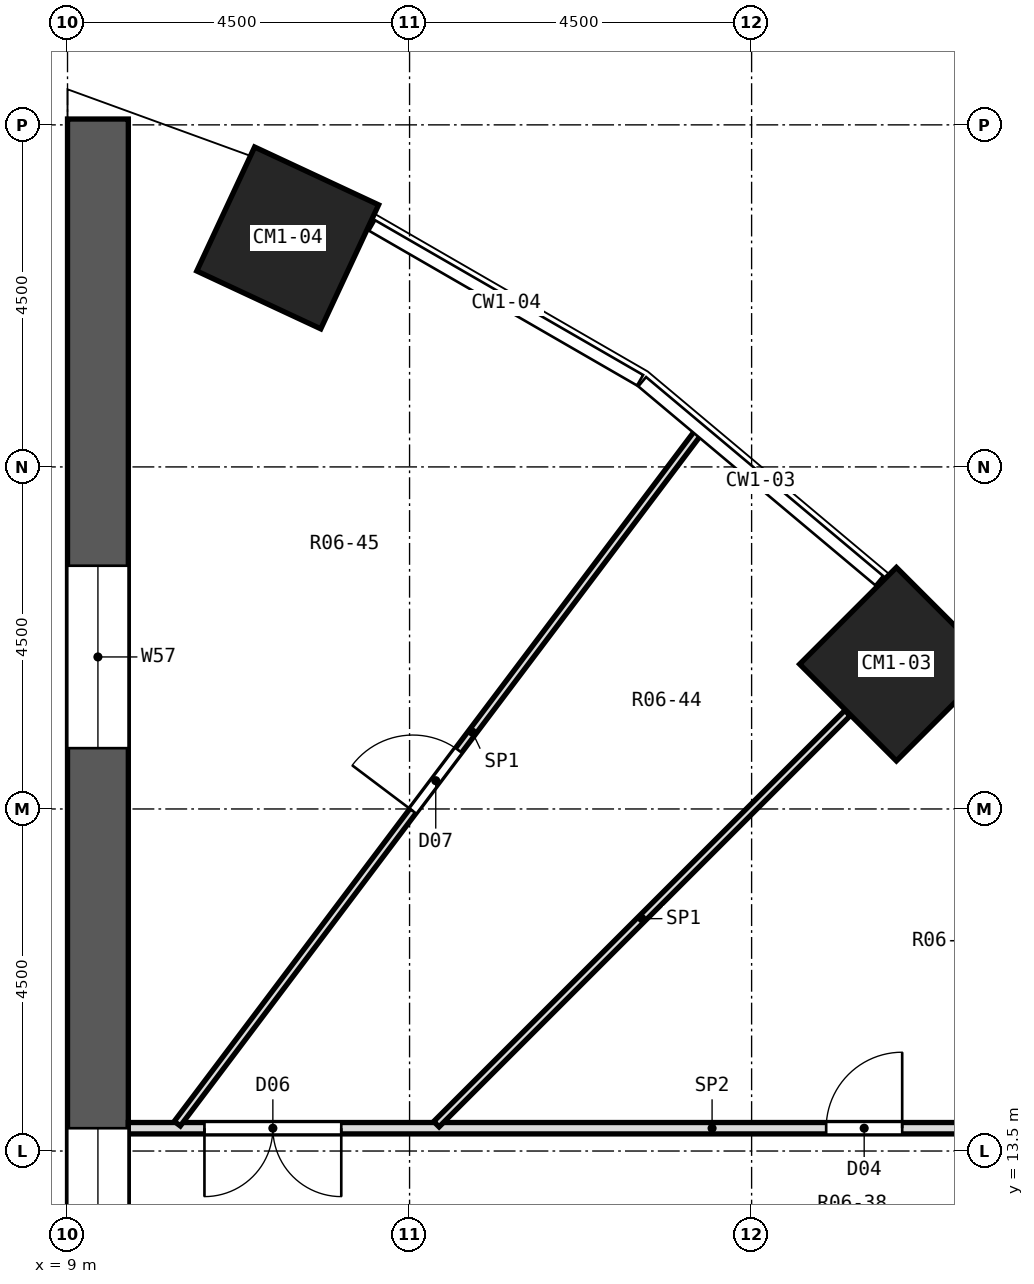
"""IFC4 building model, lengths in metres.
Left out: names, types, materials, properties, quantities, classifications, styles, units other than length and angle.
Written with IfcOpenShell. Run it as: python <this file> out.ifc"""

import sys

from ifc_helpers import new_model, si_unit, direction, frame, frame_2d, origin, origin_2d, place, context, subcontext, project, spatial, polyline, rectangle, outline, extrude, element, fill, save


model = new_model("IFC4")
c1 = context("Model", 3, precision=1e-05, world=origin(), true_north=direction((0.0, 1.0)))
c2 = subcontext(c1, "Body", "Model", "MODEL_VIEW")
j1 = project(units=[si_unit("LENGTHUNIT", "METRE"), si_unit("PLANEANGLEUNIT", "RADIAN")], contexts=[c1])
p1 = place(None, origin())
s1 = spatial("IfcSite", under=j1, at=p1, CompositionType="ELEMENT")
p2 = place(p1, origin())
s2 = spatial("IfcBuilding", under=s1, at=p2, CompositionType="ELEMENT")
p3 = place(p2, frame((0.0, 0.0, 13.4)))
s3 = spatial("IfcBuildingStorey", under=s2, at=p3, CompositionType="ELEMENT", Elevation=13.4)
for number, where, z_axis, x_axis in (
    (1, (19.905, 19.905, 0.0), (0.0, 0.0, 1.0), (0.707, 0.707, 0.0)),
    (2, (11.897, 25.512, 0.0), (0.0, 0.0, 1.0), (0.423, 0.906, 0.0)),
):
    element("IfcColumn", number, at=place(p3, frame(where, z_axis=z_axis, x_axis=x_axis)), inside=s3, PredefinedType="COLUMN", context=c2, shape_type="SweptSolid", body=[
        extrude(rectangle(XDim=1.8, YDim=1.8, at=origin_2d()), origin(), (0.0, 0.0, 1.0), 4.2),
    ])
p4 = place(p3, frame((9.4, -27.077, 0.0), z_axis=(0.0, 0.0, 1.0), x_axis=(0.0, 1.0, 0.0)))
e3 = element("IfcWall", 3, at=p4, inside=s3, PredefinedType="SHEAR", context=c2, shape_type="SweptSolid", body=[
    extrude(rectangle(XDim=54.154, YDim=0.8, at=frame_2d((27.077, 0.0))), origin(), (0.0, 0.0, 1.0), 4.2),
])
p5 = place(p4, frame((13.277, 0.0, 0.9)))
e4 = element("IfcOpeningElement", 4, at=p5, cuts=e3, PredefinedType="OPENING", context=c2, shape_type="SweptSolid", body=[
    extrude(rectangle(XDim=2.4, YDim=2.1, at=frame_2d((1.2, 1.05))), frame((0.0, 0.412, 0.0), z_axis=(0.0, -1.0, 0.0), x_axis=(1.0, 0.0, 0.0)), (0.0, 0.0, 1.0), 0.824),
])
p6 = place(p4, frame((17.877, 0.0, 0.9)))
e5 = element("IfcOpeningElement", 5, at=p6, cuts=e3, PredefinedType="OPENING", context=c2, shape_type="SweptSolid", body=[
    extrude(rectangle(XDim=2.4, YDim=2.1, at=frame_2d((1.2, 1.05))), frame((0.0, 0.412, 0.0), z_axis=(0.0, -1.0, 0.0), x_axis=(1.0, 0.0, 0.0)), (0.0, 0.0, 1.0), 0.824),
])
p7 = place(p4, frame((22.477, 0.0, 0.9)))
e6 = element("IfcOpeningElement", 6, at=p7, cuts=e3, PredefinedType="OPENING", context=c2, shape_type="SweptSolid", body=[
    extrude(rectangle(XDim=2.4, YDim=2.1, at=frame_2d((1.2, 1.05))), frame((0.0, 0.412, 0.0), z_axis=(0.0, -1.0, 0.0), x_axis=(1.0, 0.0, 0.0)), (0.0, 0.0, 1.0), 0.824),
])
p8 = place(p4, frame((29.277, 0.0, 0.9)))
e7 = element("IfcOpeningElement", 7, at=p8, cuts=e3, PredefinedType="OPENING", context=c2, shape_type="SweptSolid", body=[
    extrude(rectangle(XDim=2.4, YDim=2.1, at=frame_2d((1.2, 1.05))), frame((0.0, 0.412, 0.0), z_axis=(0.0, -1.0, 0.0), x_axis=(1.0, 0.0, 0.0)), (0.0, 0.0, 1.0), 0.824),
])
p9 = place(p4, frame((33.877, 0.0, 0.9)))
e8 = element("IfcOpeningElement", 8, at=p9, cuts=e3, PredefinedType="OPENING", context=c2, shape_type="SweptSolid", body=[
    extrude(rectangle(XDim=2.4, YDim=2.1, at=frame_2d((1.2, 1.05))), frame((0.0, 0.412, 0.0), z_axis=(0.0, -1.0, 0.0), x_axis=(1.0, 0.0, 0.0)), (0.0, 0.0, 1.0), 0.824),
])
p10 = place(p4, frame((38.477, 0.0, 0.9)))
e9 = element("IfcOpeningElement", 9, at=p10, cuts=e3, PredefinedType="OPENING", context=c2, shape_type="SweptSolid", body=[
    extrude(rectangle(XDim=2.4, YDim=2.1, at=frame_2d((1.2, 1.05))), frame((0.0, 0.412, 0.0), z_axis=(0.0, -1.0, 0.0), x_axis=(1.0, 0.0, 0.0)), (0.0, 0.0, 1.0), 0.824),
])
p11 = place(p4, frame((5.877, 0.0, 0.9)))
e10 = element("IfcOpeningElement", 10, at=p11, cuts=e3, PredefinedType="OPENING", context=c2, shape_type="SweptSolid", body=[
    extrude(rectangle(XDim=2.4, YDim=2.1, at=frame_2d((1.2, 1.05))), frame((0.0, 0.412, 0.0), z_axis=(0.0, -1.0, 0.0), x_axis=(1.0, 0.0, 0.0)), (0.0, 0.0, 1.0), 0.824),
])
p12 = place(p4, frame((45.877, 0.0, 0.9)))
e11 = element("IfcOpeningElement", 11, at=p12, cuts=e3, PredefinedType="OPENING", context=c2, shape_type="SweptSolid", body=[
    extrude(rectangle(XDim=2.4, YDim=2.1, at=frame_2d((1.2, 1.05))), frame((0.0, 0.412, 0.0), z_axis=(0.0, -1.0, 0.0), x_axis=(1.0, 0.0, 0.0)), (0.0, 0.0, 1.0), 0.824),
])
p13 = place(p3, frame((8.991, 27.443, 0.0), z_axis=(0.342026905008, 0.939688050207, 0.001991117406), x_axis=(0.93968991291, -0.342027583063, 3.2668e-08)))
e12 = element("IfcWall", 12, at=p13, inside=s3, PredefinedType="SOLIDWALL", context=c2, shape_type="SweptSolid", body=[
    extrude(outline(polyline([(0.0, 0.0), (2.81, -2.168e-19), (2.81, -3.65), (4.403e-05, -3.65), (0.0, -4.2), (-0.935, -4.2), (-0.935, -3.65), (-0.935, -0.523), (-0.657, -8.514e-08), (0.0, 0.0)])), origin(), (0.0, 0.0, -1.0), 0.38),
])
p14 = place(p3, frame((9.8, 13.8, 0.0), z_axis=(0.0, 0.0, 1.0), x_axis=(1.0, 0.0, 0.0)))
e13 = element("IfcWall", 13, at=p14, inside=s3, PredefinedType="PARTITIONING", context=c2, shape_type="SweptSolid", body=[
    extrude(rectangle(XDim=15.36, YDim=0.15, at=frame_2d((7.68, 0.0))), origin(), (0.0, 0.0, 1.0), 3.65),
])
p15 = place(p14, frame((9.181, 0.0, 0.0)))
e14 = element("IfcOpeningElement", 14, at=p15, cuts=e13, PredefinedType="OPENING", context=c2, shape_type="SweptSolid", body=[
    extrude(rectangle(XDim=1.0, YDim=2.1, at=frame_2d((0.5, 1.05))), frame((0.0, 0.087, 0.0), z_axis=(0.0, -1.0, 0.0), x_axis=(1.0, 0.0, 0.0)), (0.0, 0.0, 1.0), 0.174),
])
p16 = place(p14, frame((1.001, 0.0, 0.0)))
e15 = element("IfcOpeningElement", 15, at=p16, cuts=e13, PredefinedType="OPENING", context=c2, shape_type="SweptSolid", body=[
    extrude(rectangle(XDim=1.8, YDim=2.1, at=frame_2d((0.9, 1.05))), frame((0.0, 0.087, 0.0), z_axis=(0.0, -1.0, 0.0), x_axis=(1.0, 0.0, 0.0)), (0.0, 0.0, 1.0), 0.174),
])
p17 = place(p3, frame((13.853, 13.853, 0.0), z_axis=(0.0, 0.0, 1.0), x_axis=(0.707106781187, 0.707106781187, 0.0)))
e16 = element("IfcWall", 16, at=p17, inside=s3, PredefinedType="PARTITIONING", context=c2, shape_type="SweptSolid", body=[
    extrude(rectangle(XDim=7.649, YDim=0.1, at=frame_2d((3.824, 0.0))), origin(), (0.0, 0.0, 1.0), 3.65),
])
p18 = place(p3, frame((10.444, 13.86, 0.0), z_axis=(0.0, 0.0, 1.0), x_axis=(0.601842502347, 0.798614802248, 0.0)))
e17 = element("IfcWall", 17, at=p18, inside=s3, PredefinedType="PARTITIONING", context=c2, shape_type="SweptSolid", body=[
    extrude(rectangle(XDim=11.375, YDim=0.1, at=frame_2d((5.688, 0.0))), origin(), (0.0, 0.0, 1.0), 3.65),
])
p19 = place(p18, frame((5.15, 0.0, 0.0)))
e18 = element("IfcOpeningElement", 18, at=p19, cuts=e17, PredefinedType="OPENING", context=c2, shape_type="SweptSolid", body=[
    extrude(rectangle(XDim=1.0, YDim=2.1, at=frame_2d((0.5, 1.05))), frame((0.0, 0.062, 0.0), z_axis=(0.0, -1.0, 0.0), x_axis=(1.0, 0.0, 0.0)), (0.0, 0.0, 1.0), 0.124),
])
p20 = place(p15, origin())
e19 = element("IfcDoor", 19, at=p20, inside=s3, OperationType="SINGLE_SWING_RIGHT", PredefinedType="DOOR", context=c2, shape_type="SweptSolid", body=[
    extrude(rectangle(XDim=1.0, YDim=2.1, at=frame_2d((0.5, 1.05))), frame((0.0, 0.025, 0.0), z_axis=(0.0, -1.0, 0.0), x_axis=(1.0, 0.0, 0.0)), (0.0, 0.0, 1.0), 0.05),
])
fill(e14, e19)
p21 = place(p16, frame((1.8, 0.0, 0.0), z_axis=(0.0, 0.0, 1.0), x_axis=(-1.0, 0.0, 0.0)))
e20 = element("IfcDoor", 20, at=p21, inside=s3, OperationType="DOUBLE_DOOR_SINGLE_SWING", PredefinedType="DOOR", context=c2, shape_type="SweptSolid", body=[
    extrude(rectangle(XDim=1.8, YDim=2.1, at=frame_2d((0.9, 1.05))), frame((0.0, 0.025, 0.0), z_axis=(0.0, -1.0, 0.0), x_axis=(1.0, 0.0, 0.0)), (0.0, 0.0, 1.0), 0.05),
])
fill(e15, e20)
p22 = place(p19, origin())
e21 = element("IfcDoor", 21, at=p22, inside=s3, OperationType="SINGLE_SWING_LEFT", PredefinedType="DOOR", context=c2, shape_type="SweptSolid", body=[
    extrude(rectangle(XDim=1.0, YDim=2.1, at=frame_2d((0.5, 1.05))), frame((0.0, 0.025, 0.0), z_axis=(0.0, -1.0, 0.0), x_axis=(1.0, 0.0, 0.0)), (0.0, 0.0, 1.0), 0.05),
])
fill(e18, e21)
p23 = place(p10, origin())
e22 = element("IfcWindow", 22, at=p23, inside=s3, PartitioningType="SINGLE_PANEL", PredefinedType="WINDOW", context=c2, shape_type="SweptSolid", body=[
    extrude(rectangle(XDim=2.4, YDim=2.1, at=frame_2d((1.2, 1.05))), frame((0.0, 0.03, 0.0), z_axis=(0.0, -1.0, 0.0), x_axis=(1.0, 0.0, 0.0)), (0.0, 0.0, 1.0), 0.06),
])
fill(e9, e22)
p24 = place(p12, origin())
e23 = element("IfcWindow", 23, at=p24, inside=s3, PartitioningType="SINGLE_PANEL", PredefinedType="WINDOW", context=c2, shape_type="SweptSolid", body=[
    extrude(rectangle(XDim=2.4, YDim=2.1, at=frame_2d((1.2, 1.05))), frame((0.0, 0.03, 0.0), z_axis=(0.0, -1.0, 0.0), x_axis=(1.0, 0.0, 0.0)), (0.0, 0.0, 1.0), 0.06),
])
fill(e11, e23)
save(model, sys.argv[1])
